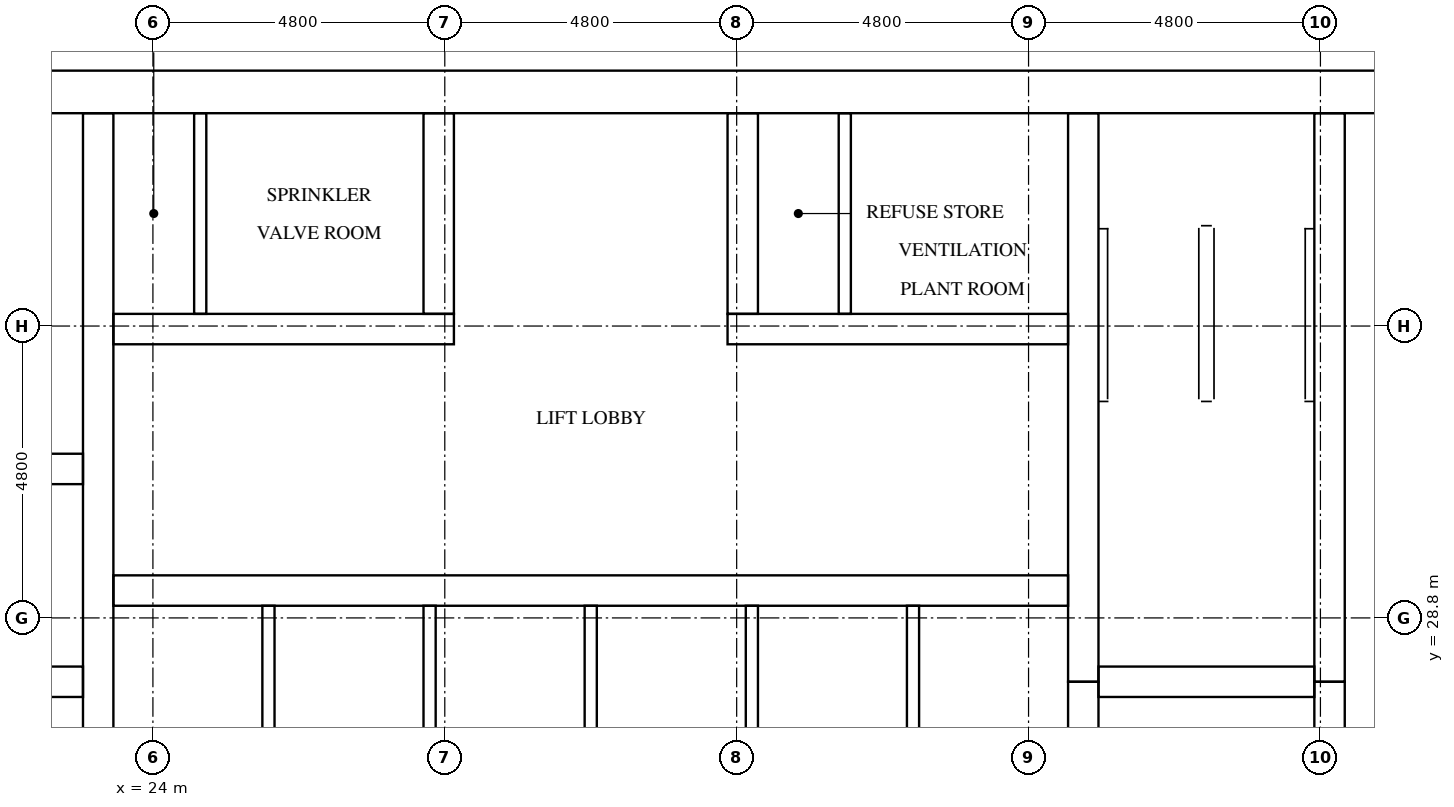
"""IFC4 building model, lengths in metres.
Left out: names, types, materials, properties, quantities, classifications, styles, units other than length and angle.
Written with IfcOpenShell. Run it as: python <this file> out.ifc"""

import sys

from ifc_helpers import new_model, si_unit, direction, frame, frame_2d, origin, place, context, subcontext, project, spatial, rectangle, extrude, element, fill, save


model = new_model("IFC4")
c1 = context("Model", 3, precision=1e-05, world=origin(), true_north=direction((0.0, 1.0)))
c2 = subcontext(c1, "Body", "Model", "MODEL_VIEW")
j1 = project(units=[si_unit("LENGTHUNIT", "METRE"), si_unit("PLANEANGLEUNIT", "RADIAN")], contexts=[c1])
p1 = place(None, origin())
s1 = spatial("IfcSite", under=j1, at=p1, CompositionType="ELEMENT")
p2 = place(p1, origin())
s2 = spatial("IfcBuilding", under=s1, at=p2, CompositionType="ELEMENT")
p3 = place(p2, frame((0.0, 0.0, 222.8)))
s3 = spatial("IfcBuildingStorey", under=s2, at=p3, CompositionType="ELEMENT", Elevation=222.8)
p4 = place(p3, frame((15.0, 37.45, 0.0), z_axis=(0.0, 0.0, 1.0), x_axis=(1.0, 0.0, 0.0)))
e1 = element("IfcWall", 1, at=p4, inside=s3, PredefinedType="SHEAR", context=c2, shape_type="SweptSolid", body=[
    extrude(rectangle(XDim=32.4, YDim=0.7, at=frame_2d((16.2, 0.0))), origin(), (0.0, 0.0, 1.0), 3.2),
])
p5 = place(p4, frame((15.3, 0.0, 0.0)))
e2 = element("IfcOpeningElement", 2, at=p5, cuts=e1, PredefinedType="OPENING", context=c2, shape_type="SweptSolid", body=[
    extrude(rectangle(XDim=1.8, YDim=2.1, at=frame_2d((0.9, 1.05))), frame((0.0, 0.36, 0.0), z_axis=(0.0, -1.0, 0.0), x_axis=(1.0, 0.0, 0.0)), (0.0, 0.0, 1.0), 0.72),
])
p6 = place(p4, frame((1.544, 0.0, 0.0)))
e3 = element("IfcOpeningElement", 3, at=p6, cuts=e1, PredefinedType="OPENING", context=c2, shape_type="SweptSolid", body=[
    extrude(rectangle(XDim=1.0, YDim=2.1, at=frame_2d((0.5, 1.05))), frame((0.0, 0.36, 0.0), z_axis=(0.0, -1.0, 0.0), x_axis=(1.0, 0.0, 0.0)), (0.0, 0.0, 1.0), 0.72),
])
p7 = place(p4, frame((5.219, 0.0, 0.0)))
e4 = element("IfcOpeningElement", 4, at=p7, cuts=e1, PredefinedType="OPENING", context=c2, shape_type="SweptSolid", body=[
    extrude(rectangle(XDim=1.0, YDim=2.1, at=frame_2d((0.5, 1.05))), frame((0.0, 0.36, 0.0), z_axis=(0.0, -1.0, 0.0), x_axis=(1.0, 0.0, 0.0)), (0.0, 0.0, 1.0), 0.72),
])
p8 = place(p3, frame((23.1, 15.7, 0.0), z_axis=(0.0, 0.0, 1.0), x_axis=(0.0, 1.0, 0.0)))
e5 = element("IfcWall", 5, at=p8, inside=s3, PredefinedType="SHEAR", context=c2, shape_type="SweptSolid", body=[
    extrude(rectangle(XDim=21.4, YDim=0.5, at=frame_2d((10.7, 0.0))), origin(), (0.0, 0.0, 1.0), 3.2),
])
p9 = place(p3, frame((39.3, 24.25, 0.0), z_axis=(0.0, 0.0, 1.0), x_axis=(0.0, 1.0, 0.0)))
e6 = element("IfcWall", 6, at=p9, inside=s3, PredefinedType="SHEAR", context=c2, shape_type="SweptSolid", body=[
    extrude(rectangle(XDim=3.5, YDim=0.5, at=frame_2d((1.75, 0.0))), origin(), (0.0, 0.0, 1.0), 3.2),
])
p10 = place(p3, frame((39.3, 27.75, 0.0), z_axis=(0.0, 0.0, 1.0), x_axis=(0.0, 1.0, 0.0)))
e7 = element("IfcWall", 7, at=p10, inside=s3, PredefinedType="SHEAR", context=c2, shape_type="SweptSolid", body=[
    extrude(rectangle(XDim=9.35, YDim=0.5, at=frame_2d((4.675, 0.0))), origin(), (0.0, 0.0, 1.0), 3.2),
])
p11 = place(p3, frame((43.35, 24.25, 0.0), z_axis=(0.0, 0.0, 1.0), x_axis=(0.0, 1.0, 0.0)))
e8 = element("IfcWall", 8, at=p11, inside=s3, PredefinedType="SHEAR", context=c2, shape_type="SweptSolid", body=[
    extrude(rectangle(XDim=3.5, YDim=0.5, at=frame_2d((1.75, 0.0))), origin(), (0.0, 0.0, 1.0), 3.2),
])
p12 = place(p11, frame((1.2, 0.0, 0.0)))
e9 = element("IfcOpeningElement", 9, at=p12, cuts=e8, PredefinedType="OPENING", context=c2, shape_type="SweptSolid", body=[
    extrude(rectangle(XDim=1.1, YDim=2.1, at=frame_2d((0.55, 1.05))), frame((0.0, 0.26, 0.0), z_axis=(0.0, -1.0, 0.0), x_axis=(1.0, 0.0, 0.0)), (0.0, 0.0, 1.0), 0.52),
])
p13 = place(p3, frame((43.35, 27.75, 0.0), z_axis=(0.0, 0.0, 1.0), x_axis=(0.0, 1.0, 0.0)))
e10 = element("IfcWall", 10, at=p13, inside=s3, PredefinedType="SHEAR", context=c2, shape_type="SweptSolid", body=[
    extrude(rectangle(XDim=9.35, YDim=0.5, at=frame_2d((4.675, 0.0))), origin(), (0.0, 0.0, 1.0), 3.2),
])
p14 = place(p13, frame((7.65, 0.0, 0.0)))
e11 = element("IfcOpeningElement", 11, at=p14, cuts=e10, PredefinedType="OPENING", context=c2, shape_type="SweptSolid", body=[
    extrude(rectangle(XDim=1.2, YDim=2.1, at=frame_2d((0.6, 1.05))), frame((0.0, 0.26, 0.0), z_axis=(0.0, -1.0, 0.0), x_axis=(1.0, 0.0, 0.0)), (0.0, 0.0, 1.0), 0.52),
])
p15 = place(p3, frame((19.3, 27.75, 0.0), z_axis=(0.0, 0.0, 1.0), x_axis=(1.0, 0.0, 0.0)))
e12 = element("IfcWall", 12, at=p15, inside=s3, PredefinedType="SHEAR", context=c2, shape_type="SweptSolid", body=[
    extrude(rectangle(XDim=3.55, YDim=0.5, at=frame_2d((1.775, 0.0))), origin(), (0.0, 0.0, 1.0), 3.2),
])
p16 = place(p3, frame((15.7, 31.25, 0.0), z_axis=(0.0, 0.0, 1.0), x_axis=(1.0, 0.0, 0.0)))
e13 = element("IfcWall", 13, at=p16, inside=s3, PredefinedType="SHEAR", context=c2, shape_type="SweptSolid", body=[
    extrude(rectangle(XDim=7.15, YDim=0.5, at=frame_2d((3.575, 0.0))), origin(), (0.0, 0.0, 1.0), 3.2),
])
p17 = place(p3, frame((39.55, 27.75, 0.0), z_axis=(0.0, 0.0, 1.0), x_axis=(1.0, 0.0, 0.0)))
e14 = element("IfcWall", 14, at=p17, inside=s3, PredefinedType="SHEAR", context=c2, shape_type="SweptSolid", body=[
    extrude(rectangle(XDim=3.55, YDim=0.5, at=frame_2d((1.775, 0.0))), origin(), (0.0, 0.0, 1.0), 3.2),
])
p18 = place(p3, frame((23.35, 29.25, 0.0), z_axis=(0.0, 0.0, 1.0), x_axis=(1.0, 0.0, 0.0)))
e15 = element("IfcWall", 15, at=p18, inside=s3, PredefinedType="SHEAR", context=c2, shape_type="SweptSolid", body=[
    extrude(rectangle(XDim=15.7, YDim=0.5, at=frame_2d((7.85, 0.0))), origin(), (0.0, 0.0, 1.0), 3.2),
])
p19 = place(p18, frame((0.675, 0.0, 0.0)))
e16 = element("IfcOpeningElement", 16, at=p19, cuts=e15, PredefinedType="OPENING", context=c2, shape_type="SweptSolid", body=[
    extrude(rectangle(XDim=1.1, YDim=2.1, at=frame_2d((0.55, 1.05))), frame((0.0, 0.26, 0.0), z_axis=(0.0, -1.0, 0.0), x_axis=(1.0, 0.0, 0.0)), (0.0, 0.0, 1.0), 0.52),
])
p20 = place(p18, frame((3.325, 0.0, 0.0)))
e17 = element("IfcOpeningElement", 17, at=p20, cuts=e15, PredefinedType="OPENING", context=c2, shape_type="SweptSolid", body=[
    extrude(rectangle(XDim=1.1, YDim=2.1, at=frame_2d((0.55, 1.05))), frame((0.0, 0.26, 0.0), z_axis=(0.0, -1.0, 0.0), x_axis=(1.0, 0.0, 0.0)), (0.0, 0.0, 1.0), 0.52),
])
p21 = place(p18, frame((5.975, 0.0, 0.0)))
e18 = element("IfcOpeningElement", 18, at=p21, cuts=e15, PredefinedType="OPENING", context=c2, shape_type="SweptSolid", body=[
    extrude(rectangle(XDim=1.1, YDim=2.1, at=frame_2d((0.55, 1.05))), frame((0.0, 0.26, 0.0), z_axis=(0.0, -1.0, 0.0), x_axis=(1.0, 0.0, 0.0)), (0.0, 0.0, 1.0), 0.52),
])
p22 = place(p18, frame((8.625, 0.0, 0.0)))
e19 = element("IfcOpeningElement", 19, at=p22, cuts=e15, PredefinedType="OPENING", context=c2, shape_type="SweptSolid", body=[
    extrude(rectangle(XDim=1.1, YDim=2.1, at=frame_2d((0.55, 1.05))), frame((0.0, 0.26, 0.0), z_axis=(0.0, -1.0, 0.0), x_axis=(1.0, 0.0, 0.0)), (0.0, 0.0, 1.0), 0.52),
])
p23 = place(p18, frame((11.275, 0.0, 0.0)))
e20 = element("IfcOpeningElement", 20, at=p23, cuts=e15, PredefinedType="OPENING", context=c2, shape_type="SweptSolid", body=[
    extrude(rectangle(XDim=1.1, YDim=2.1, at=frame_2d((0.55, 1.05))), frame((0.0, 0.26, 0.0), z_axis=(0.0, -1.0, 0.0), x_axis=(1.0, 0.0, 0.0)), (0.0, 0.0, 1.0), 0.52),
])
p24 = place(p18, frame((13.925, 0.0, 0.0)))
e21 = element("IfcOpeningElement", 21, at=p24, cuts=e15, PredefinedType="OPENING", context=c2, shape_type="SweptSolid", body=[
    extrude(rectangle(XDim=1.1, YDim=2.1, at=frame_2d((0.55, 1.05))), frame((0.0, 0.26, 0.0), z_axis=(0.0, -1.0, 0.0), x_axis=(1.0, 0.0, 0.0)), (0.0, 0.0, 1.0), 0.52),
])
p25 = place(p3, frame((23.35, 33.55, 0.0), z_axis=(0.0, 0.0, 1.0), x_axis=(1.0, 0.0, 0.0)))
e22 = element("IfcWall", 22, at=p25, inside=s3, PredefinedType="SHEAR", context=c2, shape_type="SweptSolid", body=[
    extrude(rectangle(XDim=5.6, YDim=0.5, at=frame_2d((2.8, 0.0))), origin(), (0.0, 0.0, 1.0), 3.2),
])
p26 = place(p25, frame((0.164, 0.0, 0.0)))
e23 = element("IfcOpeningElement", 23, at=p26, cuts=e22, PredefinedType="OPENING", context=c2, shape_type="SweptSolid", body=[
    extrude(rectangle(XDim=1.0, YDim=2.1, at=frame_2d((0.5, 1.05))), frame((0.0, 0.26, 0.0), z_axis=(0.0, -1.0, 0.0), x_axis=(1.0, 0.0, 0.0)), (0.0, 0.0, 1.0), 0.52),
])
p27 = place(p25, frame((2.814, 0.0, 0.0)))
e24 = element("IfcOpeningElement", 24, at=p27, cuts=e22, PredefinedType="OPENING", context=c2, shape_type="SweptSolid", body=[
    extrude(rectangle(XDim=1.0, YDim=2.1, at=frame_2d((0.5, 1.05))), frame((0.0, 0.26, 0.0), z_axis=(0.0, -1.0, 0.0), x_axis=(1.0, 0.0, 0.0)), (0.0, 0.0, 1.0), 0.52),
])
p28 = place(p3, frame((33.45, 33.55, 0.0), z_axis=(0.0, 0.0, 1.0), x_axis=(1.0, 0.0, 0.0)))
e25 = element("IfcWall", 25, at=p28, inside=s3, PredefinedType="SHEAR", context=c2, shape_type="SweptSolid", body=[
    extrude(rectangle(XDim=5.6, YDim=0.5, at=frame_2d((2.8, 0.0))), origin(), (0.0, 0.0, 1.0), 3.2),
])
p29 = place(p28, frame((0.664, 0.0, 0.0)))
e26 = element("IfcOpeningElement", 26, at=p29, cuts=e25, PredefinedType="OPENING", context=c2, shape_type="SweptSolid", body=[
    extrude(rectangle(XDim=1.0, YDim=2.1, at=frame_2d((0.5, 1.05))), frame((0.0, 0.26, 0.0), z_axis=(0.0, -1.0, 0.0), x_axis=(1.0, 0.0, 0.0)), (0.0, 0.0, 1.0), 0.52),
])
p30 = place(p28, frame((3.314, 0.0, 0.0)))
e27 = element("IfcOpeningElement", 27, at=p30, cuts=e25, PredefinedType="OPENING", context=c2, shape_type="SweptSolid", body=[
    extrude(rectangle(XDim=1.0, YDim=2.1, at=frame_2d((0.5, 1.05))), frame((0.0, 0.26, 0.0), z_axis=(0.0, -1.0, 0.0), x_axis=(1.0, 0.0, 0.0)), (0.0, 0.0, 1.0), 0.52),
])
for number, where, z_axis, x_axis in (
    (28, (28.7, 33.8, 0.0), (0.0, 0.0, 1.0), (0.0, 1.0, 0.0)),
    (29, (33.7, 33.8, 0.0), (0.0, 0.0, 1.0), (0.0, 1.0, 0.0)),
):
    element("IfcWall", number, at=place(p3, frame(where, z_axis=z_axis, x_axis=x_axis)), inside=s3, PredefinedType="SHEAR", context=c2, shape_type="SweptSolid", body=[
        extrude(rectangle(XDim=3.3, YDim=0.5, at=frame_2d((1.65, 0.0))), origin(), (0.0, 0.0, 1.0), 3.2),
    ])
for number, where, z_axis, x_axis in (
    (30, (25.9, 26.4, 0.0), (0.0, 0.0, 1.0), (0.0, 1.0, 0.0)),
    (31, (28.55, 26.4, 0.0), (0.0, 0.0, 1.0), (0.0, 1.0, 0.0)),
    (32, (31.2, 26.4, 0.0), (0.0, 0.0, 1.0), (0.0, 1.0, 0.0)),
    (33, (33.85, 26.4, 0.0), (0.0, 0.0, 1.0), (0.0, 1.0, 0.0)),
    (34, (36.5, 26.4, 0.0), (0.0, 0.0, 1.0), (0.0, 1.0, 0.0)),
):
    element("IfcWall", number, at=place(p3, frame(where, z_axis=z_axis, x_axis=x_axis)), inside=s3, PredefinedType="SOLIDWALL", context=c2, shape_type="SweptSolid", body=[
        extrude(rectangle(XDim=2.6, YDim=0.2, at=frame_2d((1.3, 0.0))), origin(), (0.0, 0.0, 1.0), 3.2),
    ])
for number, where, z_axis, x_axis in (
    (35, (24.778, 33.8, 0.0), (0.0, 0.0, 1.0), (0.0, 1.0, 0.0)),
    (36, (35.378, 33.8, 0.0), (0.0, 0.0, 1.0), (0.0, 1.0, 0.0)),
):
    element("IfcWall", number, at=place(p3, frame(where, z_axis=z_axis, x_axis=x_axis)), inside=s3, PredefinedType="PARTITIONING", context=c2, shape_type="SweptSolid", body=[
        extrude(rectangle(XDim=3.3, YDim=0.2, at=frame_2d((1.65, 0.0))), origin(), (0.0, 0.0, 1.0), 3.2),
    ])
p31 = place(p19, origin())
e37 = element("IfcDoor", 37, at=p31, inside=s3, OperationType="DOUBLE_DOOR_SLIDING", PredefinedType="DOOR", context=c2, shape_type="SweptSolid", body=[
    extrude(rectangle(XDim=1.1, YDim=2.1, at=frame_2d((0.55, 1.05))), frame((0.0, 0.025, 0.0), z_axis=(0.0, -1.0, 0.0), x_axis=(1.0, 0.0, 0.0)), (0.0, 0.0, 1.0), 0.05),
])
fill(e16, e37)
p32 = place(p20, origin())
e38 = element("IfcDoor", 38, at=p32, inside=s3, OperationType="DOUBLE_DOOR_SLIDING", PredefinedType="DOOR", context=c2, shape_type="SweptSolid", body=[
    extrude(rectangle(XDim=1.1, YDim=2.1, at=frame_2d((0.55, 1.05))), frame((0.0, 0.025, 0.0), z_axis=(0.0, -1.0, 0.0), x_axis=(1.0, 0.0, 0.0)), (0.0, 0.0, 1.0), 0.05),
])
fill(e17, e38)
p33 = place(p21, origin())
e39 = element("IfcDoor", 39, at=p33, inside=s3, OperationType="DOUBLE_DOOR_SLIDING", PredefinedType="DOOR", context=c2, shape_type="SweptSolid", body=[
    extrude(rectangle(XDim=1.1, YDim=2.1, at=frame_2d((0.55, 1.05))), frame((0.0, 0.025, 0.0), z_axis=(0.0, -1.0, 0.0), x_axis=(1.0, 0.0, 0.0)), (0.0, 0.0, 1.0), 0.05),
])
fill(e18, e39)
p34 = place(p22, origin())
e40 = element("IfcDoor", 40, at=p34, inside=s3, OperationType="DOUBLE_DOOR_SLIDING", PredefinedType="DOOR", context=c2, shape_type="SweptSolid", body=[
    extrude(rectangle(XDim=1.1, YDim=2.1, at=frame_2d((0.55, 1.05))), frame((0.0, 0.025, 0.0), z_axis=(0.0, -1.0, 0.0), x_axis=(1.0, 0.0, 0.0)), (0.0, 0.0, 1.0), 0.05),
])
fill(e19, e40)
p35 = place(p23, origin())
e41 = element("IfcDoor", 41, at=p35, inside=s3, OperationType="DOUBLE_DOOR_SLIDING", PredefinedType="DOOR", context=c2, shape_type="SweptSolid", body=[
    extrude(rectangle(XDim=1.1, YDim=2.1, at=frame_2d((0.55, 1.05))), frame((0.0, 0.025, 0.0), z_axis=(0.0, -1.0, 0.0), x_axis=(1.0, 0.0, 0.0)), (0.0, 0.0, 1.0), 0.05),
])
fill(e20, e41)
p36 = place(p24, origin())
e42 = element("IfcDoor", 42, at=p36, inside=s3, OperationType="DOUBLE_DOOR_SLIDING", PredefinedType="DOOR", context=c2, shape_type="SweptSolid", body=[
    extrude(rectangle(XDim=1.1, YDim=2.1, at=frame_2d((0.55, 1.05))), frame((0.0, 0.025, 0.0), z_axis=(0.0, -1.0, 0.0), x_axis=(1.0, 0.0, 0.0)), (0.0, 0.0, 1.0), 0.05),
])
fill(e21, e42)
p37 = place(p14, origin())
e43 = element("IfcDoor", 43, at=p37, inside=s3, OperationType="SINGLE_SWING_RIGHT", PredefinedType="DOOR", context=c2, shape_type="SweptSolid", body=[
    extrude(rectangle(XDim=1.2, YDim=2.1, at=frame_2d((0.6, 1.05))), frame((0.0, 0.025, 0.0), z_axis=(0.0, -1.0, 0.0), x_axis=(1.0, 0.0, 0.0)), (0.0, 0.0, 1.0), 0.05),
])
fill(e11, e43)
p38 = place(p5, origin())
e44 = element("IfcDoor", 44, at=p38, inside=s3, OperationType="DOUBLE_DOOR_SINGLE_SWING", PredefinedType="DOOR", context=c2, shape_type="SweptSolid", body=[
    extrude(rectangle(XDim=1.8, YDim=2.1, at=frame_2d((0.9, 1.05))), frame((0.0, 0.025, 0.0), z_axis=(0.0, -1.0, 0.0), x_axis=(1.0, 0.0, 0.0)), (0.0, 0.0, 1.0), 0.05),
])
fill(e2, e44)
p39 = place(p26, frame((1.0, 0.0, 0.0), z_axis=(0.0, 0.0, 1.0), x_axis=(-1.0, 0.0, 0.0)))
e45 = element("IfcDoor", 45, at=p39, inside=s3, OperationType="SINGLE_SWING_LEFT", PredefinedType="DOOR", context=c2, shape_type="SweptSolid", body=[
    extrude(rectangle(XDim=1.0, YDim=2.1, at=frame_2d((0.5, 1.05))), frame((0.0, 0.025, 0.0), z_axis=(0.0, -1.0, 0.0), x_axis=(1.0, 0.0, 0.0)), (0.0, 0.0, 1.0), 0.05),
])
fill(e23, e45)
p40 = place(p27, frame((1.0, 0.0, 0.0), z_axis=(0.0, 0.0, 1.0), x_axis=(-1.0, 0.0, 0.0)))
e46 = element("IfcDoor", 46, at=p40, inside=s3, OperationType="SINGLE_SWING_RIGHT", PredefinedType="DOOR", context=c2, shape_type="SweptSolid", body=[
    extrude(rectangle(XDim=1.0, YDim=2.1, at=frame_2d((0.5, 1.05))), frame((0.0, 0.025, 0.0), z_axis=(0.0, -1.0, 0.0), x_axis=(1.0, 0.0, 0.0)), (0.0, 0.0, 1.0), 0.05),
])
fill(e24, e46)
p41 = place(p29, frame((1.0, 0.0, 0.0), z_axis=(0.0, 0.0, 1.0), x_axis=(-1.0, 0.0, 0.0)))
e47 = element("IfcDoor", 47, at=p41, inside=s3, OperationType="SINGLE_SWING_LEFT", PredefinedType="DOOR", context=c2, shape_type="SweptSolid", body=[
    extrude(rectangle(XDim=1.0, YDim=2.1, at=frame_2d((0.5, 1.05))), frame((0.0, 0.025, 0.0), z_axis=(0.0, -1.0, 0.0), x_axis=(1.0, 0.0, 0.0)), (0.0, 0.0, 1.0), 0.05),
])
fill(e26, e47)
p42 = place(p30, frame((1.0, 0.0, 0.0), z_axis=(0.0, 0.0, 1.0), x_axis=(-1.0, 0.0, 0.0)))
e48 = element("IfcDoor", 48, at=p42, inside=s3, OperationType="SINGLE_SWING_RIGHT", PredefinedType="DOOR", context=c2, shape_type="SweptSolid", body=[
    extrude(rectangle(XDim=1.0, YDim=2.1, at=frame_2d((0.5, 1.05))), frame((0.0, 0.025, 0.0), z_axis=(0.0, -1.0, 0.0), x_axis=(1.0, 0.0, 0.0)), (0.0, 0.0, 1.0), 0.05),
])
fill(e27, e48)
save(model, sys.argv[1])
